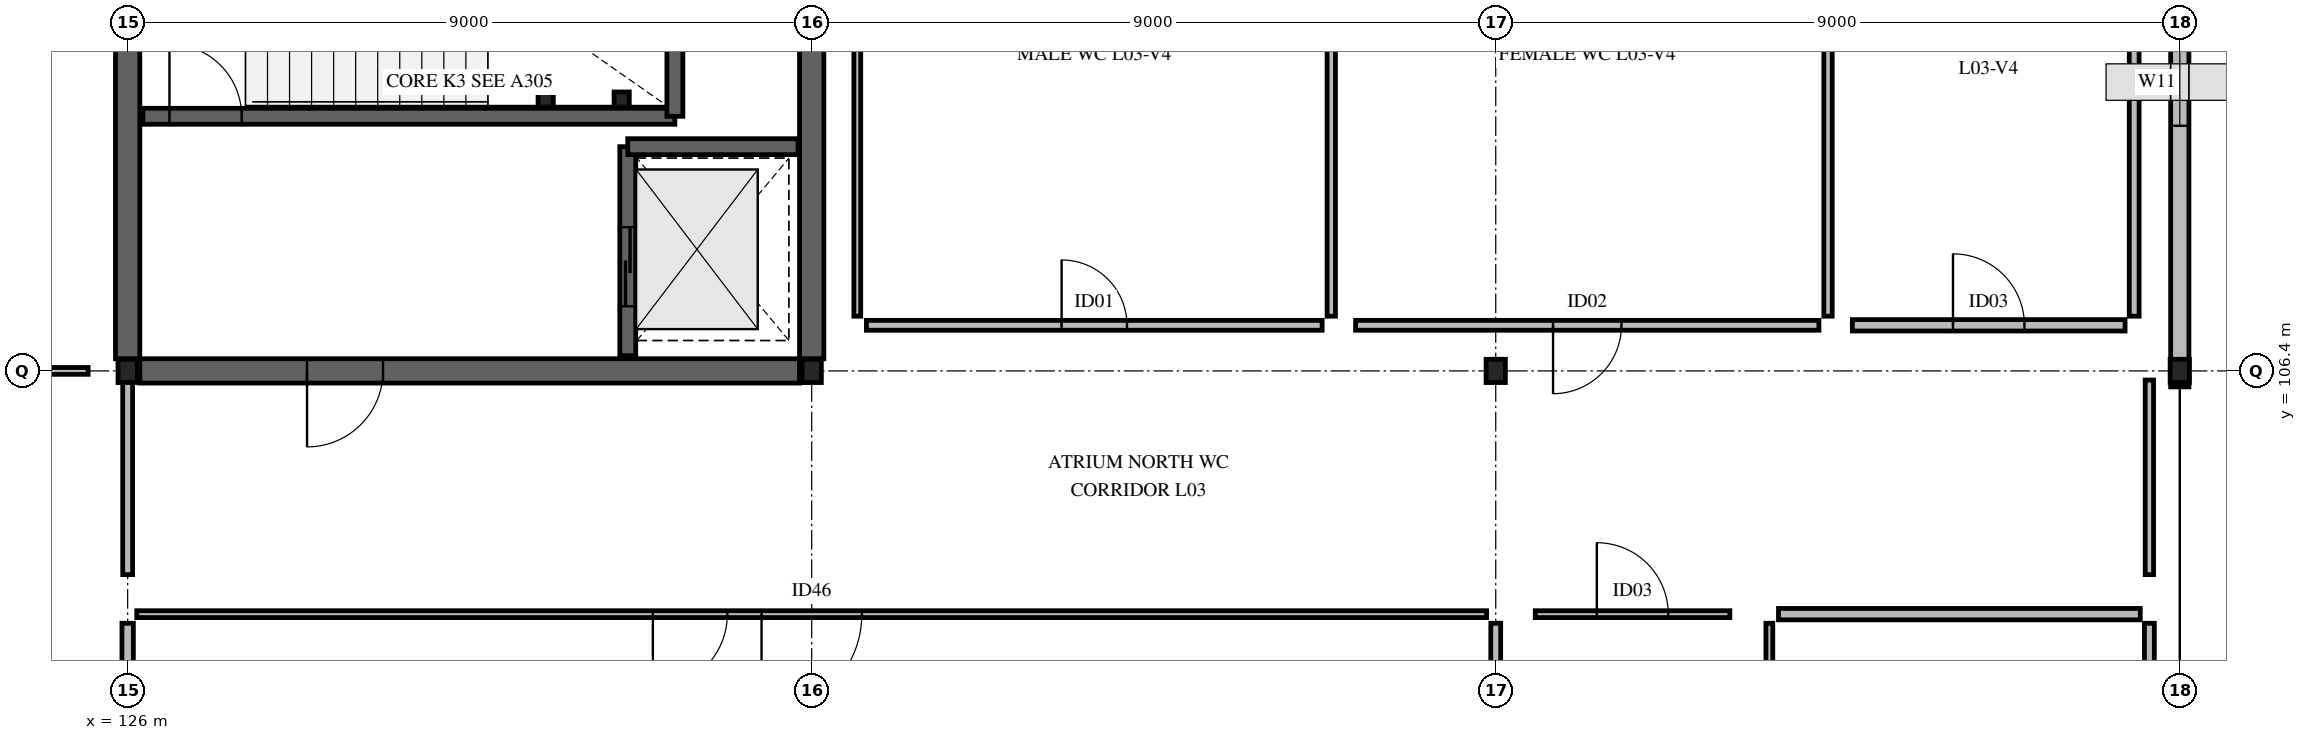
"""IFC4 building model, lengths in metres.
Left out: names, types, materials, properties, quantities, classifications, styles, units other than length and angle.
Written with IfcOpenShell. Run it as: python <this file> out.ifc"""

import sys

from ifc_helpers import new_model, si_unit, direction, frame, frame_2d, origin, origin_2d, place, context, subcontext, project, spatial, rectangle, hollow_rectangle, i_section, extrude, element, fill, save


model = new_model("IFC4")
c1 = context("Model", 3, precision=1e-05, world=origin(), true_north=direction((0.0, 1.0)))
c2 = subcontext(c1, "Body", "Model", "MODEL_VIEW")
j1 = project(units=[si_unit("LENGTHUNIT", "METRE"), si_unit("PLANEANGLEUNIT", "RADIAN")], contexts=[c1])
p1 = place(None, origin())
s1 = spatial("IfcSite", under=j1, at=p1, CompositionType="ELEMENT")
p2 = place(p1, origin())
s2 = spatial("IfcBuilding", under=s1, at=p2, CompositionType="ELEMENT")
p3 = place(p2, frame((0.0, 0.0, 13.68)))
s3 = spatial("IfcBuildingStorey", under=s2, at=p3, CompositionType="ELEMENT", Elevation=13.68)
for number, where, z_axis, x_axis in (
    (1, (126.0, 106.4, 0.0), (0.0, 0.0, 1.0), (1.0, 0.0, 0.0)),
    (2, (135.0, 106.4, 0.0), (0.0, 0.0, 1.0), (1.0, 0.0, 0.0)),
    (3, (144.0, 106.4, 0.0), (0.0, 0.0, 1.0), (1.0, 0.0, 0.0)),
    (4, (153.0, 106.4, 0.0), (0.0, 0.0, 1.0), (1.0, 0.0, 0.0)),
):
    element("IfcColumn", number, at=place(p3, frame(where, z_axis=z_axis, x_axis=x_axis)), inside=s3, PredefinedType="COLUMN", context=c2, shape_type="SweptSolid", body=[
        extrude(i_section(OverallWidth=0.254, OverallDepth=0.306, WebThickness=0.009, FlangeThickness=0.015, FilletRadius=0.015, at=origin_2d()), origin(), (0.0, 0.0, 1.0), 4.32),
    ])
p4 = place(p3, frame((153.0, 106.19, 0.0), z_axis=(0.0, 0.0, 1.0), x_axis=(0.0, 1.0, 0.0)))
e5 = element("IfcWall", 5, at=p4, inside=s3, PredefinedType="STANDARD", context=c2, shape_type="SweptSolid", body=[
    extrude(rectangle(XDim=7.81, YDim=0.24, at=frame_2d((3.905, 0.0))), origin(), (0.0, 0.0, 1.0), 4.06),
])
p5 = place(p4, frame((3.435, 0.0, 0.85)))
e6 = element("IfcOpeningElement", 6, at=p5, cuts=e5, PredefinedType="OPENING", context=c2, shape_type="SweptSolid", body=[
    extrude(rectangle(XDim=1.15, YDim=1.35, at=frame_2d((0.575, 0.675))), frame((0.0, 0.13, 0.0), z_axis=(0.0, -1.0, 0.0), x_axis=(1.0, 0.0, 0.0)), (0.0, 0.0, 1.0), 0.26),
])
p6 = place(p3, frame((126.16, 106.4, 0.0), z_axis=(0.0, 0.0, 1.0), x_axis=(1.0, 0.0, 0.0)))
e7 = element("IfcWall", 7, at=p6, inside=s3, PredefinedType="SHEAR", context=c2, shape_type="SweptSolid", body=[
    extrude(rectangle(XDim=8.68, YDim=0.32, at=frame_2d((4.34, 0.0))), origin(), (0.0, 0.0, 1.0), 4.04),
])
p7 = place(p6, frame((2.2, 0.0, 0.0)))
e8 = element("IfcOpeningElement", 8, at=p7, cuts=e7, PredefinedType="OPENING", context=c2, shape_type="SweptSolid", body=[
    extrude(rectangle(XDim=1.0, YDim=2.15, at=frame_2d((0.5, 1.075))), frame((0.0, 0.17, 0.0), z_axis=(0.0, -1.0, 0.0), x_axis=(1.0, 0.0, 0.0)), (0.0, 0.0, 1.0), 0.34),
])
for number, where, z_axis, x_axis in (
    (9, (126.0, 106.56, 0.0), (0.0, 0.0, 1.0), (0.0, 1.0, 0.0)),
    (10, (135.0, 106.56, 0.0), (0.0, 0.0, 1.0), (0.0, 1.0, 0.0)),
):
    element("IfcWall", number, at=place(p3, frame(where, z_axis=z_axis, x_axis=x_axis)), inside=s3, PredefinedType="SHEAR", context=c2, shape_type="SweptSolid", body=[
        extrude(rectangle(XDim=7.28, YDim=0.32, at=frame_2d((3.64, 0.0))), origin(), (0.0, 0.0, 1.0), 4.04),
    ])
p8 = place(p3, frame((126.2, 109.75, 0.0), z_axis=(0.0, 0.0, 1.0), x_axis=(1.0, 0.0, 0.0)))
e11 = element("IfcWall", 11, at=p8, inside=s3, PredefinedType="SOLIDWALL", context=c2, shape_type="SweptSolid", body=[
    extrude(rectangle(XDim=7.0, YDim=0.21, at=frame_2d((3.5, 0.0))), origin(), (0.0, 0.0, 1.0), 4.04),
])
p9 = place(p8, frame((0.35, 0.0, 0.0)))
e12 = element("IfcOpeningElement", 12, at=p9, cuts=e11, PredefinedType="OPENING", context=c2, shape_type="SweptSolid", body=[
    extrude(rectangle(XDim=0.95, YDim=2.12, at=frame_2d((0.475, 1.06))), frame((0.0, 0.115, 0.0), z_axis=(0.0, -1.0, 0.0), x_axis=(1.0, 0.0, 0.0)), (0.0, 0.0, 1.0), 0.23),
])
p10 = place(p3, frame((133.2, 109.75, 0.0), z_axis=(0.0, 0.0, 1.0), x_axis=(0.0, 1.0, 0.0)))
e13 = element("IfcWall", 13, at=p10, inside=s3, PredefinedType="SOLIDWALL", context=c2, shape_type="SweptSolid", body=[
    extrude(rectangle(XDim=4.05, YDim=0.21, at=frame_2d((2.025, 0.0))), origin(), (0.0, 0.0, 1.0), 4.04),
])
p11 = place(p3, frame((132.58, 106.6, 0.0), z_axis=(0.0, 0.0, 1.0), x_axis=(0.0, 1.0, 0.0)))
e14 = element("IfcWall", 14, at=p11, inside=s3, PredefinedType="SOLIDWALL", context=c2, shape_type="SweptSolid", body=[
    extrude(rectangle(XDim=2.75, YDim=0.21, at=frame_2d((1.375, 0.0))), origin(), (0.0, 0.0, 1.0), 4.04),
])
p12 = place(p11, frame((0.65, 0.0, 0.0)))
e15 = element("IfcOpeningElement", 15, at=p12, cuts=e14, PredefinedType="OPENING", context=c2, shape_type="SweptSolid", body=[
    extrude(rectangle(XDim=1.04, YDim=2.1, at=frame_2d((0.52, 1.05))), frame((0.0, 0.115, 0.0), z_axis=(0.0, -1.0, 0.0), x_axis=(1.0, 0.0, 0.0)), (0.0, 0.0, 1.0), 0.23),
])
p13 = place(p3, frame((132.58, 109.35, 0.0), z_axis=(0.0, 0.0, 1.0), x_axis=(1.0, 0.0, 0.0)))
e16 = element("IfcWall", 16, at=p13, inside=s3, PredefinedType="SOLIDWALL", context=c2, shape_type="SweptSolid", body=[
    extrude(rectangle(XDim=2.24, YDim=0.21, at=frame_2d((1.12, 0.0))), origin(), (0.0, 0.0, 1.0), 4.04),
])
for number, where, z_axis, x_axis in (
    (17, (131.5, 109.97, 0.0), (0.0, 0.0, 1.0), (1.0, 0.0, 0.0)),
    (18, (132.5, 109.97, 0.0), (0.0, 0.0, 1.0), (1.0, 0.0, 0.0)),
):
    element("IfcColumn", number, at=place(p3, frame(where, z_axis=z_axis, x_axis=x_axis)), inside=s3, PredefinedType="COLUMN", context=c2, shape_type="SweptSolid", body=[
        extrude(hollow_rectangle(XDim=0.2, YDim=0.2, WallThickness=0.012, at=origin_2d()), origin(), (0.0, 0.0, 1.0), 1.97),
    ])
p14 = place(p3, frame((126.12, 103.2, 0.0), z_axis=(0.0, 0.0, 1.0), x_axis=(1.0, 0.0, 0.0)))
e19 = element("IfcWall", 19, at=p14, inside=s3, PredefinedType="PARTITIONING", context=c2, shape_type="SweptSolid", body=[
    extrude(rectangle(XDim=17.76, YDim=0.09, at=frame_2d((8.88, 0.0))), origin(), (0.0, 0.0, 1.0), 4.04),
])
p15 = place(p14, frame((8.22, 0.0, 0.0)))
e20 = element("IfcOpeningElement", 20, at=p15, cuts=e19, PredefinedType="OPENING", context=c2, shape_type="SweptSolid", body=[
    extrude(rectangle(XDim=1.32, YDim=2.2, at=frame_2d((0.66, 1.1))), frame((0.0, 0.055, 0.0), z_axis=(0.0, -1.0, 0.0), x_axis=(1.0, 0.0, 0.0)), (0.0, 0.0, 1.0), 0.11),
])
p16 = place(p14, frame((6.79, 0.0, 0.0)))
e21 = element("IfcOpeningElement", 21, at=p16, cuts=e19, PredefinedType="OPENING", context=c2, shape_type="SweptSolid", body=[
    extrude(rectangle(XDim=0.98, YDim=2.06, at=frame_2d((0.49, 1.03))), frame((0.0, 0.055, 0.0), z_axis=(0.0, -1.0, 0.0), x_axis=(1.0, 0.0, 0.0)), (0.0, 0.0, 1.0), 0.11),
])
p17 = place(p3, frame((126.0, 91.72, 0.0), z_axis=(0.0, 0.0, 1.0), x_axis=(0.0, 1.0, 0.0)))
e22 = element("IfcWall", 22, at=p17, inside=s3, PredefinedType="PARTITIONING", context=c2, shape_type="SweptSolid", body=[
    extrude(rectangle(XDim=11.36, YDim=0.15, at=frame_2d((5.68, 0.0))), origin(), (0.0, 0.0, 1.0), 3.631),
])
p18 = place(p17, frame((5.23, 0.0, 0.0)))
e23 = element("IfcOpeningElement", 23, at=p18, cuts=e22, PredefinedType="OPENING", context=c2, shape_type="SweptSolid", body=[
    extrude(rectangle(XDim=1.0, YDim=2.15, at=frame_2d((0.5, 1.075))), frame((0.0, 0.085, 0.0), z_axis=(0.0, -1.0, 0.0), x_axis=(1.0, 0.0, 0.0)), (0.0, 0.0, 1.0), 0.17),
])
p19 = place(p3, frame((144.0, 91.72, 0.0), z_axis=(0.0, 0.0, 1.0), x_axis=(0.0, 1.0, 0.0)))
e24 = element("IfcWall", 24, at=p19, inside=s3, PredefinedType="PARTITIONING", context=c2, shape_type="SweptSolid", body=[
    extrude(rectangle(XDim=11.36, YDim=0.13, at=frame_2d((5.68, 0.0))), origin(), (0.0, 0.0, 1.0), 3.788),
])
p20 = place(p3, frame((147.6, 68.92, 0.0), z_axis=(0.0, 0.0, 1.0), x_axis=(0.0, 1.0, 0.0)))
e25 = element("IfcWall", 25, at=p20, inside=s3, PredefinedType="PARTITIONING", context=c2, shape_type="SweptSolid", body=[
    extrude(rectangle(XDim=34.16, YDim=0.09, at=frame_2d((17.08, 0.0))), origin(), (0.0, 0.0, 1.0), 4.04),
])
p21 = place(p20, frame((16.37, 0.0, 0.0)))
e26 = element("IfcOpeningElement", 26, at=p21, cuts=e25, PredefinedType="OPENING", context=c2, shape_type="SweptSolid", body=[
    extrude(rectangle(XDim=1.42, YDim=2.2, at=frame_2d((0.71, 1.1))), frame((0.0, 0.055, 0.0), z_axis=(0.0, -1.0, 0.0), x_axis=(1.0, 0.0, 0.0)), (0.0, 0.0, 1.0), 0.11),
])
p22 = place(p3, frame((147.72, 103.2, 0.0), z_axis=(0.0, 0.0, 1.0), x_axis=(1.0, 0.0, 0.0)))
e27 = element("IfcWall", 27, at=p22, inside=s3, PredefinedType="PARTITIONING", context=c2, shape_type="SweptSolid", body=[
    extrude(rectangle(XDim=4.76, YDim=0.15, at=frame_2d((2.38, 0.0))), origin(), (0.0, 0.0, 1.0), 4.04),
])
p23 = place(p3, frame((152.6, 68.92, 0.0), z_axis=(0.0, 0.0, 1.0), x_axis=(0.0, 1.0, 0.0)))
e28 = element("IfcWall", 28, at=p23, inside=s3, PredefinedType="PARTITIONING", context=c2, shape_type="SweptSolid", body=[
    extrude(rectangle(XDim=34.16, YDim=0.13, at=frame_2d((17.08, 0.0))), origin(), (0.0, 0.0, 1.0), 4.04),
])
p24 = place(p3, frame((117.52, 106.4, 0.0), z_axis=(0.0, 0.0, 1.0), x_axis=(1.0, 0.0, 0.0)))
e29 = element("IfcWall", 29, at=p24, inside=s3, PredefinedType="PARTITIONING", context=c2, shape_type="SweptSolid", body=[
    extrude(rectangle(XDim=7.96, YDim=0.09, at=frame_2d((3.98, 0.0))), origin(), (0.0, 0.0, 1.0), 3.555),
])
p25 = place(p24, frame((3.23, 0.0, 0.0)))
e30 = element("IfcOpeningElement", 30, at=p25, cuts=e29, PredefinedType="OPENING", context=c2, shape_type="SweptSolid", body=[
    extrude(rectangle(XDim=1.5, YDim=2.2, at=frame_2d((0.75, 1.1))), frame((0.0, 0.055, 0.0), z_axis=(0.0, -1.0, 0.0), x_axis=(1.0, 0.0, 0.0)), (0.0, 0.0, 1.0), 0.11),
])
p26 = place(p3, frame((135.72, 107.0, 0.0), z_axis=(0.0, 0.0, 1.0), x_axis=(1.0, 0.0, 0.0)))
e31 = element("IfcWall", 31, at=p26, inside=s3, PredefinedType="PARTITIONING", context=c2, shape_type="SweptSolid", body=[
    extrude(rectangle(XDim=5.996, YDim=0.13, at=frame_2d((2.998, 0.0))), origin(), (0.0, 0.0, 1.0), 4.04),
])
p27 = place(p26, frame((2.568, 0.0, 0.0)))
e32 = element("IfcOpeningElement", 32, at=p27, cuts=e31, PredefinedType="OPENING", context=c2, shape_type="SweptSolid", body=[
    extrude(rectangle(XDim=0.86, YDim=2.06, at=frame_2d((0.43, 1.03))), frame((0.0, 0.075, 0.0), z_axis=(0.0, -1.0, 0.0), x_axis=(1.0, 0.0, 0.0)), (0.0, 0.0, 1.0), 0.15),
])
p28 = place(p3, frame((141.836, 107.12, 0.0), z_axis=(0.0, 0.0, 1.0), x_axis=(0.0, 1.0, 0.0)))
e33 = element("IfcWall", 33, at=p28, inside=s3, PredefinedType="PARTITIONING", context=c2, shape_type="SweptSolid", body=[
    extrude(rectangle(XDim=6.16, YDim=0.11, at=frame_2d((3.08, 0.0))), origin(), (0.0, 0.0, 1.0), 4.04),
])
p29 = place(p3, frame((135.6, 107.12, 0.0), z_axis=(0.0, 0.0, 1.0), x_axis=(0.0, 1.0, 0.0)))
e34 = element("IfcWall", 34, at=p29, inside=s3, PredefinedType="PARTITIONING", context=c2, shape_type="SweptSolid", body=[
    extrude(rectangle(XDim=6.16, YDim=0.09, at=frame_2d((3.08, 0.0))), origin(), (0.0, 0.0, 1.0), 4.04),
])
p30 = place(p3, frame((142.156, 107.0, 0.0), z_axis=(0.0, 0.0, 1.0), x_axis=(1.0, 0.0, 0.0)))
e35 = element("IfcWall", 35, at=p30, inside=s3, PredefinedType="PARTITIONING", context=c2, shape_type="SweptSolid", body=[
    extrude(rectangle(XDim=6.096, YDim=0.13, at=frame_2d((3.048, 0.0))), origin(), (0.0, 0.0, 1.0), 4.04),
])
p31 = place(p30, frame((2.598, 0.0, 0.0)))
e36 = element("IfcOpeningElement", 36, at=p31, cuts=e35, PredefinedType="OPENING", context=c2, shape_type="SweptSolid", body=[
    extrude(rectangle(XDim=0.9, YDim=2.06, at=frame_2d((0.45, 1.03))), frame((0.0, 0.075, 0.0), z_axis=(0.0, -1.0, 0.0), x_axis=(1.0, 0.0, 0.0)), (0.0, 0.0, 1.0), 0.15),
])
p32 = place(p3, frame((148.372, 107.12, 0.0), z_axis=(0.0, 0.0, 1.0), x_axis=(0.0, 1.0, 0.0)))
e37 = element("IfcWall", 37, at=p32, inside=s3, PredefinedType="PARTITIONING", context=c2, shape_type="SweptSolid", body=[
    extrude(rectangle(XDim=6.16, YDim=0.11, at=frame_2d((3.08, 0.0))), origin(), (0.0, 0.0, 1.0), 4.04),
])
p33 = place(p3, frame((148.692, 107.0, 0.0), z_axis=(0.0, 0.0, 1.0), x_axis=(1.0, 0.0, 0.0)))
e38 = element("IfcWall", 38, at=p33, inside=s3, PredefinedType="PARTITIONING", context=c2, shape_type="SweptSolid", body=[
    extrude(rectangle(XDim=3.588, YDim=0.15, at=frame_2d((1.794, 0.0))), origin(), (0.0, 0.0, 1.0), 4.04),
])
p34 = place(p33, frame((1.324, 0.0, 0.0)))
e39 = element("IfcOpeningElement", 39, at=p34, cuts=e38, PredefinedType="OPENING", context=c2, shape_type="SweptSolid", body=[
    extrude(rectangle(XDim=0.94, YDim=2.06, at=frame_2d((0.47, 1.03))), frame((0.0, 0.085, 0.0), z_axis=(0.0, -1.0, 0.0), x_axis=(1.0, 0.0, 0.0)), (0.0, 0.0, 1.0), 0.17),
])
p35 = place(p3, frame((152.4, 107.12, 0.0), z_axis=(0.0, 0.0, 1.0), x_axis=(0.0, 1.0, 0.0)))
e40 = element("IfcWall", 40, at=p35, inside=s3, PredefinedType="PARTITIONING", context=c2, shape_type="SweptSolid", body=[
    extrude(rectangle(XDim=6.16, YDim=0.13, at=frame_2d((3.08, 0.0))), origin(), (0.0, 0.0, 1.0), 4.04),
])
p36 = place(p3, frame((144.52, 103.2, 0.0), z_axis=(0.0, 0.0, 1.0), x_axis=(1.0, 0.0, 0.0)))
e41 = element("IfcWall", 41, at=p36, inside=s3, PredefinedType="PARTITIONING", context=c2, shape_type="SweptSolid", body=[
    extrude(rectangle(XDim=2.56, YDim=0.09, at=frame_2d((1.28, 0.0))), origin(), (0.0, 0.0, 1.0), 4.04),
])
p37 = place(p36, frame((0.81, 0.0, 0.0)))
e42 = element("IfcOpeningElement", 42, at=p37, cuts=e41, PredefinedType="OPENING", context=c2, shape_type="SweptSolid", body=[
    extrude(rectangle(XDim=0.94, YDim=2.06, at=frame_2d((0.47, 1.03))), frame((0.0, 0.055, 0.0), z_axis=(0.0, -1.0, 0.0), x_axis=(1.0, 0.0, 0.0)), (0.0, 0.0, 1.0), 0.11),
])
p38 = place(p3, frame((126.0, 103.72, 0.0), z_axis=(0.0, 0.0, 1.0), x_axis=(0.0, 1.0, 0.0)))
e43 = element("IfcWall", 43, at=p38, inside=s3, PredefinedType="PARTITIONING", context=c2, shape_type="SweptSolid", body=[
    extrude(rectangle(XDim=2.56, YDim=0.13, at=frame_2d((1.28, 0.0))), origin(), (0.0, 0.0, 1.0), 3.631),
])
p39 = place(p3, frame((152.6, 103.72, 0.0), z_axis=(0.0, 0.0, 1.0), x_axis=(0.0, 1.0, 0.0)))
e44 = element("IfcWall", 44, at=p39, inside=s3, PredefinedType="PARTITIONING", context=c2, shape_type="SweptSolid", body=[
    extrude(rectangle(XDim=2.56, YDim=0.11, at=frame_2d((1.28, 0.0))), origin(), (0.0, 0.0, 1.0), 4.04),
])
p40 = place(p5, origin())
e45 = element("IfcWindow", 45, at=p40, inside=s3, PartitioningType="SINGLE_PANEL", PredefinedType="WINDOW", context=c2, shape_type="SweptSolid", body=[
    extrude(rectangle(XDim=1.15, YDim=1.35, at=frame_2d((0.575, 0.675))), frame((0.0, 0.03, 0.0), z_axis=(0.0, -1.0, 0.0), x_axis=(1.0, 0.0, 0.0)), (0.0, 0.0, 1.0), 0.06),
])
fill(e6, e45)
p41 = place(p9, origin())
e46 = element("IfcDoor", 46, at=p41, inside=s3, OperationType="SINGLE_SWING_LEFT", PredefinedType="DOOR", context=c2, shape_type="SweptSolid", body=[
    extrude(rectangle(XDim=0.95, YDim=2.12, at=frame_2d((0.475, 1.06))), frame((0.0, 0.025, 0.0), z_axis=(0.0, -1.0, 0.0), x_axis=(1.0, 0.0, 0.0)), (0.0, 0.0, 1.0), 0.05),
])
fill(e12, e46)
p42 = place(p12, origin())
e47 = element("IfcDoor", 47, at=p42, inside=s3, OperationType="SLIDING_TO_LEFT", PredefinedType="DOOR", context=c2, shape_type="SweptSolid", body=[
    extrude(rectangle(XDim=1.04, YDim=2.1, at=frame_2d((0.52, 1.05))), frame((0.0, 0.025, 0.0), z_axis=(0.0, -1.0, 0.0), x_axis=(1.0, 0.0, 0.0)), (0.0, 0.0, 1.0), 0.05),
])
fill(e15, e47)
p43 = place(p7, origin())
e48 = element("IfcDoor", 48, at=p43, inside=s3, OperationType="SINGLE_SWING_RIGHT", PredefinedType="DOOR", context=c2, shape_type="SweptSolid", body=[
    extrude(rectangle(XDim=1.0, YDim=2.15, at=frame_2d((0.5, 1.075))), frame((0.0, 0.025, 0.0), z_axis=(0.0, -1.0, 0.0), x_axis=(1.0, 0.0, 0.0)), (0.0, 0.0, 1.0), 0.05),
])
fill(e8, e48)
p44 = place(p15, origin())
e49 = element("IfcDoor", 49, at=p44, inside=s3, OperationType="SINGLE_SWING_RIGHT", PredefinedType="DOOR", context=c2, shape_type="SweptSolid", body=[
    extrude(rectangle(XDim=1.32, YDim=2.2, at=frame_2d((0.66, 1.1))), frame((0.0, 0.025, 0.0), z_axis=(0.0, -1.0, 0.0), x_axis=(1.0, 0.0, 0.0)), (0.0, 0.0, 1.0), 0.05),
])
fill(e20, e49)
p45 = place(p27, origin())
e50 = element("IfcDoor", 50, at=p45, inside=s3, OperationType="SINGLE_SWING_LEFT", PredefinedType="DOOR", context=c2, shape_type="SweptSolid", body=[
    extrude(rectangle(XDim=0.86, YDim=2.06, at=frame_2d((0.43, 1.03))), frame((0.0, 0.025, 0.0), z_axis=(0.0, -1.0, 0.0), x_axis=(1.0, 0.0, 0.0)), (0.0, 0.0, 1.0), 0.05),
])
fill(e32, e50)
p46 = place(p31, origin())
e51 = element("IfcDoor", 51, at=p46, inside=s3, OperationType="SINGLE_SWING_RIGHT", PredefinedType="DOOR", context=c2, shape_type="SweptSolid", body=[
    extrude(rectangle(XDim=0.9, YDim=2.06, at=frame_2d((0.45, 1.03))), frame((0.0, 0.025, 0.0), z_axis=(0.0, -1.0, 0.0), x_axis=(1.0, 0.0, 0.0)), (0.0, 0.0, 1.0), 0.05),
])
fill(e36, e51)
p47 = place(p34, origin())
e52 = element("IfcDoor", 52, at=p47, inside=s3, OperationType="SINGLE_SWING_LEFT", PredefinedType="DOOR", context=c2, shape_type="SweptSolid", body=[
    extrude(rectangle(XDim=0.94, YDim=2.06, at=frame_2d((0.47, 1.03))), frame((0.0, 0.025, 0.0), z_axis=(0.0, -1.0, 0.0), x_axis=(1.0, 0.0, 0.0)), (0.0, 0.0, 1.0), 0.05),
])
fill(e39, e52)
p48 = place(p37, origin())
e53 = element("IfcDoor", 53, at=p48, inside=s3, OperationType="SINGLE_SWING_LEFT", PredefinedType="DOOR", context=c2, shape_type="SweptSolid", body=[
    extrude(rectangle(XDim=0.94, YDim=2.06, at=frame_2d((0.47, 1.03))), frame((0.0, 0.025, 0.0), z_axis=(0.0, -1.0, 0.0), x_axis=(1.0, 0.0, 0.0)), (0.0, 0.0, 1.0), 0.05),
])
fill(e42, e53)
p49 = place(p16, origin())
e54 = element("IfcDoor", 54, at=p49, inside=s3, OperationType="SINGLE_SWING_RIGHT", PredefinedType="DOOR", context=c2, shape_type="SweptSolid", body=[
    extrude(rectangle(XDim=0.98, YDim=2.06, at=frame_2d((0.49, 1.03))), frame((0.0, 0.025, 0.0), z_axis=(0.0, -1.0, 0.0), x_axis=(1.0, 0.0, 0.0)), (0.0, 0.0, 1.0), 0.05),
])
fill(e21, e54)
save(model, sys.argv[1])
